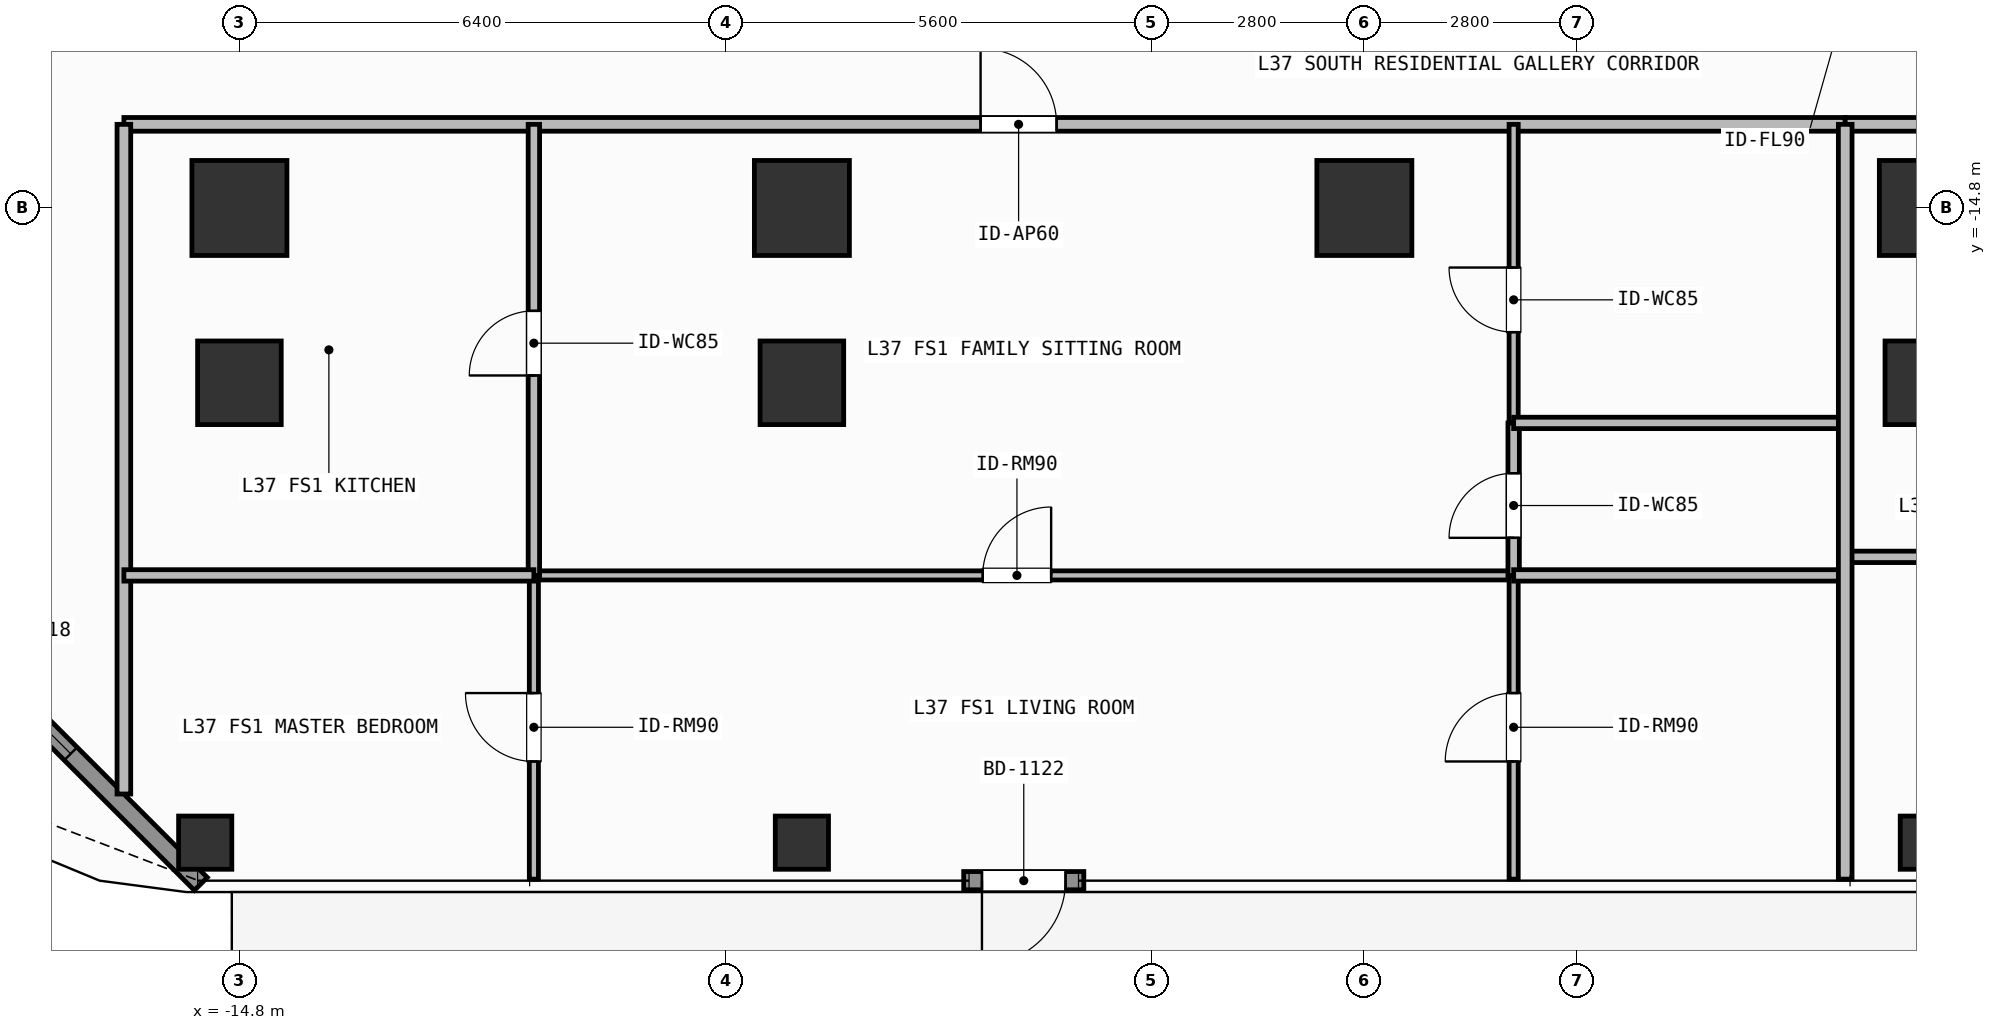
"""IFC4 building model, lengths in metres.
Left out: names, types, materials, properties, quantities, classifications, styles, units other than length and angle.
Written with IfcOpenShell. Run it as: python <this file> out.ifc"""

import sys

from ifc_helpers import new_model, si_unit, direction, frame, frame_2d, origin, origin_2d, place, context, subcontext, project, spatial, rectangle, hollow_rectangle, extrude, element, fill, save


model = new_model("IFC4")
c1 = context("Model", 3, precision=1e-05, world=origin(), true_north=direction((0.0, 1.0)))
c2 = subcontext(c1, "Body", "Model", "MODEL_VIEW")
j1 = project(units=[si_unit("LENGTHUNIT", "METRE"), si_unit("PLANEANGLEUNIT", "RADIAN")], contexts=[c1])
p1 = place(None, origin())
s1 = spatial("IfcSite", under=j1, at=p1, CompositionType="ELEMENT")
p2 = place(p1, origin())
s2 = spatial("IfcBuilding", under=s1, at=p2, CompositionType="ELEMENT")
p3 = place(p2, frame((0.0, 0.0, 148.5)))
s3 = spatial("IfcBuildingStorey", under=s2, at=p3, CompositionType="ELEMENT", Elevation=148.5)
for number, where, z_axis, x_axis in (
    (1, (-14.8, -14.8, 0.0), (0.0, 0.0, 1.0), (1.0, 0.0, 0.0)),
    (2, (-7.4, -14.8, 0.0), (0.0, 0.0, 1.0), (1.0, 0.0, 0.0)),
    (3, (0.0, -14.8, 0.0), (0.0, 0.0, 1.0), (1.0, 0.0, 0.0)),
    (4, (7.4, -14.8, 0.0), (0.0, 0.0, 1.0), (1.0, 0.0, 0.0)),
):
    element("IfcColumn", number, at=place(p3, frame(where, z_axis=z_axis, x_axis=x_axis)), inside=s3, PredefinedType="COLUMN", context=c2, shape_type="SweptSolid", body=[
        extrude(rectangle(XDim=1.25, YDim=1.25, at=origin_2d()), origin(), (0.0, 0.0, 1.0), 3.9),
    ])
for number, where, z_axis, x_axis in (
    (5, (-14.8, -17.1, 0.0), (0.0, 0.0, 1.0), (1.0, 0.0, 0.0)),
    (6, (-7.4, -17.1, 0.0), (0.0, 0.0, 1.0), (1.0, 0.0, 0.0)),
    (7, (7.4, -17.1, 0.0), (0.0, 0.0, 1.0), (1.0, 0.0, 0.0)),
):
    element("IfcColumn", number, at=place(p3, frame(where, z_axis=z_axis, x_axis=x_axis)), inside=s3, PredefinedType="COLUMN", context=c2, shape_type="SweptSolid", body=[
        extrude(rectangle(XDim=1.1, YDim=1.1, at=origin_2d()), origin(), (0.0, 0.0, 1.0), 3.9),
    ])
for number, where, z_axis, x_axis in (
    (8, (-15.25, -23.15, 0.0), (0.0, 0.0, 1.0), (1.0, 0.0, 0.0)),
    (9, (-7.4, -23.15, 0.0), (0.0, 0.0, 1.0), (1.0, 0.0, 0.0)),
    (10, (7.4, -23.15, 0.0), (0.0, 0.0, 1.0), (1.0, 0.0, 0.0)),
):
    element("IfcColumn", number, at=place(p3, frame(where, z_axis=z_axis, x_axis=x_axis)), inside=s3, PredefinedType="COLUMN", context=c2, shape_type="SweptSolid", body=[
        extrude(hollow_rectangle(XDim=0.7, YDim=0.7, WallThickness=0.032, at=origin_2d()), origin(), (0.0, 0.0, 1.0), 3.9),
    ])
p4 = place(p3, frame((-3.691, -23.65, 0.0), z_axis=(0.0, 0.0, 1.0), x_axis=(-1.0, 0.0, 0.0)))
e11 = element("IfcWall", 11, at=p4, inside=s3, PredefinedType="SOLIDWALL", context=c2, shape_type="SweptSolid", body=[
    extrude(rectangle(XDim=1.58, YDim=0.24, at=frame_2d((0.79, 0.0))), origin(), (0.0, 0.0, 1.0), 3.68),
])
p5 = place(p4, frame((0.24, 0.0, 0.0)))
e12 = element("IfcOpeningElement", 12, at=p5, cuts=e11, PredefinedType="OPENING", context=c2, shape_type="SweptSolid", body=[
    extrude(rectangle(XDim=1.1, YDim=2.2, at=frame_2d((0.55, 1.1))), frame((0.0, 0.13, 0.0), z_axis=(0.0, -1.0, 0.0), x_axis=(1.0, 0.0, 0.0)), (0.0, 0.0, 1.0), 0.26),
])
p6 = place(p3, frame((-15.308, -23.692, 0.0), z_axis=(0.0, 0.0, 1.0), x_axis=(-0.707106781187, 0.707106781187, 0.0)))
e13 = element("IfcWall", 13, at=p6, inside=s3, PredefinedType="SOLIDWALL", context=c2, shape_type="SweptSolid", body=[
    extrude(rectangle(XDim=6.343, YDim=0.24, at=frame_2d((3.171, 0.0))), origin(), (0.0, 0.0, 1.0), 3.68),
])
p7 = place(p6, frame((2.421, 0.0, 0.8)))
e14 = element("IfcOpeningElement", 14, at=p7, cuts=e13, PredefinedType="OPENING", context=c2, shape_type="SweptSolid", body=[
    extrude(rectangle(XDim=1.5, YDim=1.85, at=frame_2d((0.75, 0.925))), frame((0.0, 0.13, 0.0), z_axis=(0.0, -1.0, 0.0), x_axis=(1.0, 0.0, 0.0)), (0.0, 0.0, 1.0), 0.26),
])
p8 = place(p3, frame((-16.32, -13.7, 0.0), z_axis=(0.0, 0.0, 1.0), x_axis=(1.0, 0.0, 0.0)))
e15 = element("IfcWall", 15, at=p8, inside=s3, PredefinedType="PARTITIONING", context=c2, shape_type="SweptSolid", body=[
    extrude(rectangle(XDim=22.646, YDim=0.18, at=frame_2d((11.323, 0.0))), origin(), (0.0, 0.0, 1.0), 3.68),
])
p9 = place(p8, frame((11.271, 0.0, 0.0)))
e16 = element("IfcOpeningElement", 16, at=p9, cuts=e15, PredefinedType="OPENING", context=c2, shape_type="SweptSolid", body=[
    extrude(rectangle(XDim=1.0, YDim=2.2, at=frame_2d((0.5, 1.1))), frame((0.0, 0.1, 0.0), z_axis=(0.0, -1.0, 0.0), x_axis=(1.0, 0.0, 0.0)), (0.0, 0.0, 1.0), 0.2),
])
p10 = place(p3, frame((-10.926, -19.634, 0.0), z_axis=(0.0, 0.0, 1.0), x_axis=(1.0, 0.0, 0.0)))
e17 = element("IfcWall", 17, at=p10, inside=s3, PredefinedType="PARTITIONING", context=c2, shape_type="SweptSolid", body=[
    extrude(rectangle(XDim=12.89, YDim=0.12, at=frame_2d((6.445, 0.0))), origin(), (0.0, 0.0, 1.0), 3.68),
])
p11 = place(p10, frame((5.905, 0.0, 0.0)))
e18 = element("IfcOpeningElement", 18, at=p11, cuts=e17, PredefinedType="OPENING", context=c2, shape_type="SweptSolid", body=[
    extrude(rectangle(XDim=0.9, YDim=2.1, at=frame_2d((0.45, 1.05))), frame((0.0, 0.07, 0.0), z_axis=(0.0, -1.0, 0.0), x_axis=(1.0, 0.0, 0.0)), (0.0, 0.0, 1.0), 0.14),
])
p12 = place(p3, frame((-10.926, -19.634, 0.0), z_axis=(0.0, 0.0, 1.0), x_axis=(0.0, 1.0, 0.0)))
e19 = element("IfcWall", 19, at=p12, inside=s3, PredefinedType="PARTITIONING", context=c2, shape_type="SweptSolid", body=[
    extrude(rectangle(XDim=5.934, YDim=0.15, at=frame_2d((2.967, 0.0))), origin(), (0.0, 0.0, 1.0), 3.37),
])
p13 = place(p12, frame((2.63, 0.0, 0.0)))
e20 = element("IfcOpeningElement", 20, at=p13, cuts=e19, PredefinedType="OPENING", context=c2, shape_type="SweptSolid", body=[
    extrude(rectangle(XDim=0.85, YDim=2.1, at=frame_2d((0.425, 1.05))), frame((0.0, 0.085, 0.0), z_axis=(0.0, -1.0, 0.0), x_axis=(1.0, 0.0, 0.0)), (0.0, 0.0, 1.0), 0.17),
])
p14 = place(p3, frame((-10.926, -23.63, 0.0), z_axis=(0.0, 0.0, 1.0), x_axis=(0.0, 1.0, 0.0)))
e21 = element("IfcWall", 21, at=p14, inside=s3, PredefinedType="PARTITIONING", context=c2, shape_type="SweptSolid", body=[
    extrude(rectangle(XDim=3.996, YDim=0.12, at=frame_2d((1.998, 0.0))), origin(), (0.0, 0.0, 1.0), 3.37),
])
p15 = place(p14, frame((1.548, 0.0, 0.0)))
e22 = element("IfcOpeningElement", 22, at=p15, cuts=e21, PredefinedType="OPENING", context=c2, shape_type="SweptSolid", body=[
    extrude(rectangle(XDim=0.9, YDim=2.1, at=frame_2d((0.45, 1.05))), frame((0.0, 0.07, 0.0), z_axis=(0.0, -1.0, 0.0), x_axis=(1.0, 0.0, 0.0)), (0.0, 0.0, 1.0), 0.14),
])
p16 = place(p3, frame((1.964, -19.634, 0.0), z_axis=(0.0, 0.0, 1.0), x_axis=(0.0, 1.0, 0.0)))
e23 = element("IfcWall", 23, at=p16, inside=s3, PredefinedType="PARTITIONING", context=c2, shape_type="SweptSolid", body=[
    extrude(rectangle(XDim=2.006, YDim=0.15, at=frame_2d((1.003, 0.0))), origin(), (0.0, 0.0, 1.0), 3.68),
])
p17 = place(p16, frame((0.494, 0.0, 0.0)))
e24 = element("IfcOpeningElement", 24, at=p17, cuts=e23, PredefinedType="OPENING", context=c2, shape_type="SweptSolid", body=[
    extrude(rectangle(XDim=0.85, YDim=2.1, at=frame_2d((0.425, 1.05))), frame((0.0, 0.085, 0.0), z_axis=(0.0, -1.0, 0.0), x_axis=(1.0, 0.0, 0.0)), (0.0, 0.0, 1.0), 0.17),
])
p18 = place(p3, frame((1.964, -17.628, 0.0), z_axis=(0.0, 0.0, 1.0), x_axis=(0.0, 1.0, 0.0)))
e25 = element("IfcWall", 25, at=p18, inside=s3, PredefinedType="PARTITIONING", context=c2, shape_type="SweptSolid", body=[
    extrude(rectangle(XDim=3.928, YDim=0.12, at=frame_2d((1.964, 0.0))), origin(), (0.0, 0.0, 1.0), 3.68),
])
p19 = place(p18, frame((1.194, 0.0, 0.0)))
e26 = element("IfcOpeningElement", 26, at=p19, cuts=e25, PredefinedType="OPENING", context=c2, shape_type="SweptSolid", body=[
    extrude(rectangle(XDim=0.85, YDim=2.1, at=frame_2d((0.425, 1.05))), frame((0.0, 0.07, 0.0), z_axis=(0.0, -1.0, 0.0), x_axis=(1.0, 0.0, 0.0)), (0.0, 0.0, 1.0), 0.14),
])
p20 = place(p3, frame((1.964, -23.63, 0.0), z_axis=(0.0, 0.0, 1.0), x_axis=(0.0, 1.0, 0.0)))
e27 = element("IfcWall", 27, at=p20, inside=s3, PredefinedType="PARTITIONING", context=c2, shape_type="SweptSolid", body=[
    extrude(rectangle(XDim=3.996, YDim=0.12, at=frame_2d((1.998, 0.0))), origin(), (0.0, 0.0, 1.0), 3.68),
])
p21 = place(p20, frame((1.548, 0.0, 0.0)))
e28 = element("IfcOpeningElement", 28, at=p21, cuts=e27, PredefinedType="OPENING", context=c2, shape_type="SweptSolid", body=[
    extrude(rectangle(XDim=0.9, YDim=2.1, at=frame_2d((0.45, 1.05))), frame((0.0, 0.07, 0.0), z_axis=(0.0, -1.0, 0.0), x_axis=(1.0, 0.0, 0.0)), (0.0, 0.0, 1.0), 0.14),
])
p22 = place(p3, frame((6.326, -13.7, 0.0), z_axis=(0.0, 0.0, 1.0), x_axis=(1.0, 0.0, 0.0)))
e29 = element("IfcWall", 29, at=p22, inside=s3, PredefinedType="PARTITIONING", context=c2, shape_type="SweptSolid", body=[
    extrude(rectangle(XDim=17.794, YDim=0.18, at=frame_2d((8.897, 0.0))), origin(), (0.0, 0.0, 1.0), 3.68),
])
p23 = place(p22, frame((9.292, 0.0, 0.0)))
e30 = element("IfcOpeningElement", 30, at=p23, cuts=e29, PredefinedType="OPENING", context=c2, shape_type="SweptSolid", body=[
    extrude(rectangle(XDim=1.0, YDim=2.2, at=frame_2d((0.5, 1.1))), frame((0.0, 0.1, 0.0), z_axis=(0.0, -1.0, 0.0), x_axis=(1.0, 0.0, 0.0)), (0.0, 0.0, 1.0), 0.2),
])
p24 = place(p3, frame((-16.32, -22.51, 0.0), z_axis=(0.0, 0.0, 1.0), x_axis=(0.0, 1.0, 0.0)))
e31 = element("IfcWall", 31, at=p24, inside=s3, PredefinedType="PARTITIONING", context=c2, shape_type="SweptSolid", body=[
    extrude(rectangle(XDim=8.81, YDim=0.18, at=frame_2d((4.405, 0.0))), origin(), (0.0, 0.0, 1.0), 3.68),
])
p25 = place(p3, frame((-16.32, -19.634, 0.0), z_axis=(0.0, 0.0, 1.0), x_axis=(1.0, 0.0, 0.0)))
e32 = element("IfcWall", 32, at=p25, inside=s3, PredefinedType="PARTITIONING", context=c2, shape_type="SweptSolid", body=[
    extrude(rectangle(XDim=5.394, YDim=0.15, at=frame_2d((2.697, 0.0))), origin(), (0.0, 0.0, 1.0), 3.68),
])
for number, where, z_axis, x_axis in (
    (33, (1.964, -17.628, 0.0), (0.0, 0.0, 1.0), (1.0, 0.0, 0.0)),
    (34, (1.964, -19.634, 0.0), (0.0, 0.0, 1.0), (1.0, 0.0, 0.0)),
):
    element("IfcWall", number, at=place(p3, frame(where, z_axis=z_axis, x_axis=x_axis)), inside=s3, PredefinedType="PARTITIONING", context=c2, shape_type="SweptSolid", body=[
        extrude(rectangle(XDim=4.362, YDim=0.15, at=frame_2d((2.181, 0.0))), origin(), (0.0, 0.0, 1.0), 3.68),
    ])
p26 = place(p3, frame((6.326, -19.39, 0.0), z_axis=(0.0, 0.0, 1.0), x_axis=(1.0, 0.0, 0.0)))
e35 = element("IfcWall", 35, at=p26, inside=s3, PredefinedType="PARTITIONING", context=c2, shape_type="SweptSolid", body=[
    extrude(rectangle(XDim=6.014, YDim=0.15, at=frame_2d((3.007, 0.0))), origin(), (0.0, 0.0, 1.0), 3.68),
])
p27 = place(p3, frame((6.326, -23.63, 0.0), z_axis=(0.0, 0.0, 1.0), x_axis=(0.0, 1.0, 0.0)))
e36 = element("IfcWall", 36, at=p27, inside=s3, PredefinedType="PARTITIONING", context=c2, shape_type="SweptSolid", body=[
    extrude(rectangle(XDim=9.93, YDim=0.18, at=frame_2d((4.965, 0.0))), origin(), (0.0, 0.0, 1.0), 3.68),
])
p28 = place(p5, origin())
e37 = element("IfcDoor", 37, at=p28, inside=s3, OperationType="SINGLE_SWING_RIGHT", PredefinedType="DOOR", context=c2, shape_type="SweptSolid", body=[
    extrude(rectangle(XDim=1.1, YDim=2.2, at=frame_2d((0.55, 1.1))), frame((0.0, 0.025, 0.0), z_axis=(0.0, -1.0, 0.0), x_axis=(1.0, 0.0, 0.0)), (0.0, 0.0, 1.0), 0.05),
])
fill(e12, e37)
p29 = place(p7, origin())
e38 = element("IfcWindow", 38, at=p29, inside=s3, PartitioningType="SINGLE_PANEL", PredefinedType="WINDOW", context=c2, shape_type="SweptSolid", body=[
    extrude(rectangle(XDim=1.5, YDim=1.85, at=frame_2d((0.75, 0.925))), frame((0.0, 0.03, 0.0), z_axis=(0.0, -1.0, 0.0), x_axis=(1.0, 0.0, 0.0)), (0.0, 0.0, 1.0), 0.06),
])
fill(e14, e38)
p30 = place(p9, origin())
e39 = element("IfcDoor", 39, at=p30, inside=s3, OperationType="SINGLE_SWING_LEFT", PredefinedType="DOOR", context=c2, shape_type="SweptSolid", body=[
    extrude(rectangle(XDim=1.0, YDim=2.2, at=frame_2d((0.5, 1.1))), frame((0.0, 0.025, 0.0), z_axis=(0.0, -1.0, 0.0), x_axis=(1.0, 0.0, 0.0)), (0.0, 0.0, 1.0), 0.05),
])
fill(e16, e39)
p31 = place(p11, origin())
e40 = element("IfcDoor", 40, at=p31, inside=s3, OperationType="SINGLE_SWING_RIGHT", PredefinedType="DOOR", context=c2, shape_type="SweptSolid", body=[
    extrude(rectangle(XDim=0.9, YDim=2.1, at=frame_2d((0.45, 1.05))), frame((0.0, 0.025, 0.0), z_axis=(0.0, -1.0, 0.0), x_axis=(1.0, 0.0, 0.0)), (0.0, 0.0, 1.0), 0.05),
])
fill(e18, e40)
p32 = place(p13, origin())
e41 = element("IfcDoor", 41, at=p32, inside=s3, OperationType="SINGLE_SWING_LEFT", PredefinedType="DOOR", context=c2, shape_type="SweptSolid", body=[
    extrude(rectangle(XDim=0.85, YDim=2.1, at=frame_2d((0.425, 1.05))), frame((0.0, 0.025, 0.0), z_axis=(0.0, -1.0, 0.0), x_axis=(1.0, 0.0, 0.0)), (0.0, 0.0, 1.0), 0.05),
])
fill(e20, e41)
p33 = place(p15, origin())
e42 = element("IfcDoor", 42, at=p33, inside=s3, OperationType="SINGLE_SWING_RIGHT", PredefinedType="DOOR", context=c2, shape_type="SweptSolid", body=[
    extrude(rectangle(XDim=0.9, YDim=2.1, at=frame_2d((0.45, 1.05))), frame((0.0, 0.025, 0.0), z_axis=(0.0, -1.0, 0.0), x_axis=(1.0, 0.0, 0.0)), (0.0, 0.0, 1.0), 0.05),
])
fill(e22, e42)
p34 = place(p17, origin())
e43 = element("IfcDoor", 43, at=p34, inside=s3, OperationType="SINGLE_SWING_LEFT", PredefinedType="DOOR", context=c2, shape_type="SweptSolid", body=[
    extrude(rectangle(XDim=0.85, YDim=2.1, at=frame_2d((0.425, 1.05))), frame((0.0, 0.025, 0.0), z_axis=(0.0, -1.0, 0.0), x_axis=(1.0, 0.0, 0.0)), (0.0, 0.0, 1.0), 0.05),
])
fill(e24, e43)
p35 = place(p19, origin())
e44 = element("IfcDoor", 44, at=p35, inside=s3, OperationType="SINGLE_SWING_RIGHT", PredefinedType="DOOR", context=c2, shape_type="SweptSolid", body=[
    extrude(rectangle(XDim=0.85, YDim=2.1, at=frame_2d((0.425, 1.05))), frame((0.0, 0.025, 0.0), z_axis=(0.0, -1.0, 0.0), x_axis=(1.0, 0.0, 0.0)), (0.0, 0.0, 1.0), 0.05),
])
fill(e26, e44)
p36 = place(p21, origin())
e45 = element("IfcDoor", 45, at=p36, inside=s3, OperationType="SINGLE_SWING_LEFT", PredefinedType="DOOR", context=c2, shape_type="SweptSolid", body=[
    extrude(rectangle(XDim=0.9, YDim=2.1, at=frame_2d((0.45, 1.05))), frame((0.0, 0.025, 0.0), z_axis=(0.0, -1.0, 0.0), x_axis=(1.0, 0.0, 0.0)), (0.0, 0.0, 1.0), 0.05),
])
fill(e28, e45)
save(model, sys.argv[1])
